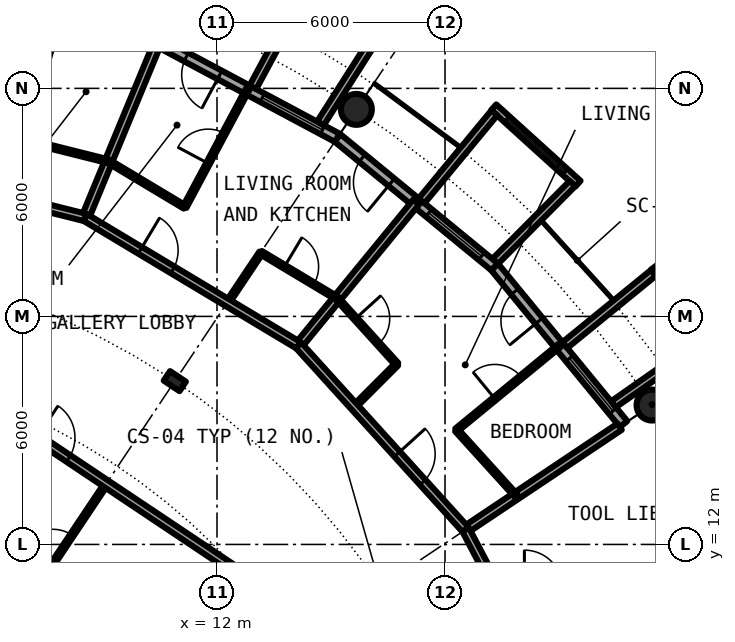
"""IFC4 building model, lengths in metres.
Left out: names, types, materials, properties, quantities, classifications, styles, units other than length and angle.
Written with IfcOpenShell. Run it as: python <this file> out.ifc"""

import sys

from ifc_helpers import new_model, si_unit, direction, frame, frame_2d, origin, origin_2d, place, context, subcontext, project, spatial, rectangle, circle, hollow_circle, i_section, extrude, element, fill, save


model = new_model("IFC4")
c1 = context("Model", 3, precision=1e-05, world=origin(), true_north=direction((0.0, 1.0)))
c2 = subcontext(c1, "Body", "Model", "MODEL_VIEW")
j1 = project(units=[si_unit("LENGTHUNIT", "METRE"), si_unit("PLANEANGLEUNIT", "RADIAN")], contexts=[c1])
p1 = place(None, origin())
s1 = spatial("IfcSite", under=j1, at=p1, CompositionType="ELEMENT")
p2 = place(p1, origin())
s2 = spatial("IfcBuilding", under=s1, at=p2, CompositionType="ELEMENT")
p3 = place(p2, frame((0.0, 0.0, 145.2)))
s3 = spatial("IfcBuildingStorey", under=s2, at=p3, CompositionType="ELEMENT", Elevation=145.2)
for number, where, z_axis, x_axis in (
    (1, (23.448, 15.667, 0.0), (0.0, 0.0, 1.0), (1.0, 0.0, 0.0)),
    (2, (15.667, 23.448, 0.0), (0.0, 0.0, 1.0), (1.0, 0.0, 0.0)),
):
    element("IfcColumn", number, at=place(p3, frame(where, z_axis=z_axis, x_axis=x_axis)), inside=s3, PredefinedType="COLUMN", context=c2, shape_type="SweptSolid", body=[
        extrude(hollow_circle(Radius=0.406, WallThickness=0.04, at=origin_2d()), origin(), (0.0, 0.0, 1.0), 3.05),
    ])
p4 = place(p3, frame((10.889, 16.297, 0.0), z_axis=(0.0, 0.0, 1.0), x_axis=(0.55557023302, 0.831469612303, 0.0)))
e3 = element("IfcColumn", 3, at=p4, inside=s3, PredefinedType="COLUMN", context=c2, shape_type="SweptSolid", body=[
    extrude(i_section(OverallWidth=0.3, OverallDepth=0.5, WebThickness=0.014, FlangeThickness=0.028, FilletRadius=0.027, at=origin_2d()), origin(), (0.0, 0.0, 1.0), 3.05),
])
p5 = place(p3, frame((22.699, 15.167, 0.0), z_axis=(0.0, 0.0, 1.0), x_axis=(-0.634382322723, 0.773019449054, 0.0)))
e4 = element("IfcWall", 4, at=p5, inside=s3, PredefinedType="SOLIDWALL", context=c2, shape_type="SweptSolid", body=[
    extrude(rectangle(XDim=5.352, YDim=0.25, at=frame_2d((2.676, 0.0))), origin(), (0.0, 0.0, 1.0), 2.7),
])
p6 = place(p5, frame((0.441, 0.0, 0.3)))
e5 = element("IfcOpeningElement", 5, at=p6, cuts=e4, PredefinedType="OPENING", context=c2, shape_type="SweptSolid", body=[
    extrude(rectangle(XDim=1.8, YDim=2.1, at=frame_2d((0.9, 1.05))), frame((0.0, 0.135, 0.0), z_axis=(0.0, -1.0, 0.0), x_axis=(1.0, 0.0, 0.0)), (0.0, 0.0, 1.0), 0.27),
])
p7 = place(p5, frame((3.51, 0.0, 0.0)))
e6 = element("IfcOpeningElement", 6, at=p7, cuts=e4, PredefinedType="OPENING", context=c2, shape_type="SweptSolid", body=[
    extrude(rectangle(XDim=1.0, YDim=2.2, at=frame_2d((0.5, 1.1))), frame((0.0, 0.135, 0.0), z_axis=(0.0, -1.0, 0.0), x_axis=(1.0, 0.0, 0.0)), (0.0, 0.0, 1.0), 0.27),
])
p8 = place(p3, frame((24.972, 17.337, -0.03), z_axis=(0.0, 0.0, 1.0), x_axis=(-0.602806268067, 0.797887588059, 0.0)))
e7 = element("IfcWall", 7, at=p8, inside=s3, PredefinedType="SOLIDWALL", context=c2, shape_type="SweptSolid", body=[
    extrude(rectangle(XDim=2.447, YDim=0.2, at=frame_2d((1.223, 0.0))), origin(), (0.0, 0.0, 1.0), 2.73),
])
p9 = place(p8, frame((0.183, 0.0, 0.33)))
e8 = element("IfcOpeningElement", 8, at=p9, cuts=e7, PredefinedType="OPENING", context=c2, shape_type="SweptSolid", body=[
    extrude(circle(Radius=1.04, at=frame_2d((1.04, 1.04))), frame((0.0, 0.11, 0.0), z_axis=(0.0, -1.0, 0.0), x_axis=(1.0, 0.0, 0.0)), (0.0, 0.0, 1.0), 0.22),
])
p10 = place(p3, frame((22.433, 15.688, -0.03), z_axis=(0.0, 0.0, 1.0), x_axis=(0.819373043115, 0.573260687834, 0.0)))
e9 = element("IfcWall", 9, at=p10, inside=s3, PredefinedType="SOLIDWALL", context=c2, shape_type="SweptSolid", body=[
    extrude(rectangle(XDim=2.925, YDim=0.2, at=frame_2d((1.463, 0.0))), origin(), (0.0, 0.0, 1.0), 2.73),
])
p11 = place(p3, frame((21.155, 17.246, -0.03), z_axis=(0.0, 0.0, 1.0), x_axis=(0.775179004516, 0.631741648902, 0.0)))
e10 = element("IfcWall", 10, at=p11, inside=s3, PredefinedType="SOLIDWALL", context=c2, shape_type="SweptSolid", body=[
    extrude(rectangle(XDim=3.006, YDim=0.2, at=frame_2d((1.503, 0.0))), origin(), (0.0, 0.0, 1.0), 2.73),
])
p12 = place(p3, frame((19.304, 19.304, 0.0), z_axis=(0.0, 0.0, 1.0), x_axis=(-0.773019449054, 0.634382322723, 0.0)))
e11 = element("IfcWall", 11, at=p12, inside=s3, PredefinedType="SOLIDWALL", context=c2, shape_type="SweptSolid", body=[
    extrude(rectangle(XDim=5.352, YDim=0.25, at=frame_2d((2.676, 0.0))), origin(), (0.0, 0.0, 1.0), 2.7),
])
p13 = place(p12, frame((0.441, 0.0, 0.3)))
e12 = element("IfcOpeningElement", 12, at=p13, cuts=e11, PredefinedType="OPENING", context=c2, shape_type="SweptSolid", body=[
    extrude(rectangle(XDim=1.8, YDim=2.1, at=frame_2d((0.9, 1.05))), frame((0.0, 0.135, 0.0), z_axis=(0.0, -1.0, 0.0), x_axis=(1.0, 0.0, 0.0)), (0.0, 0.0, 1.0), 0.27),
])
p14 = place(p12, frame((3.51, 0.0, 0.0)))
e13 = element("IfcOpeningElement", 13, at=p14, cuts=e11, PredefinedType="OPENING", context=c2, shape_type="SweptSolid", body=[
    extrude(rectangle(XDim=1.0, YDim=2.2, at=frame_2d((0.5, 1.1))), frame((0.0, 0.135, 0.0), z_axis=(0.0, -1.0, 0.0), x_axis=(1.0, 0.0, 0.0)), (0.0, 0.0, 1.0), 0.27),
])
p15 = place(p3, frame((21.5, 21.493, -0.03), z_axis=(0.0, 0.0, 1.0), x_axis=(-0.740998365753, 0.671506829416, 0.0)))
e14 = element("IfcWall", 14, at=p15, inside=s3, PredefinedType="SOLIDWALL", context=c2, shape_type="SweptSolid", body=[
    extrude(rectangle(XDim=2.993, YDim=0.2, at=frame_2d((1.497, 0.0))), origin(), (0.0, 0.0, 1.0), 2.73),
])
p16 = place(p15, frame((0.457, 0.0, 0.33)))
e15 = element("IfcOpeningElement", 15, at=p16, cuts=e14, PredefinedType="OPENING", context=c2, shape_type="SweptSolid", body=[
    extrude(circle(Radius=1.04, at=frame_2d((1.04, 1.04))), frame((0.0, 0.11, 0.0), z_axis=(0.0, -1.0, 0.0), x_axis=(1.0, 0.0, 0.0)), (0.0, 0.0, 1.0), 0.22),
])
p17 = place(p3, frame((19.323, 19.45, -0.03), z_axis=(0.0, 0.0, 1.0), x_axis=(0.704476739375, 0.709727076896, 0.0)))
e16 = element("IfcWall", 16, at=p17, inside=s3, PredefinedType="SOLIDWALL", context=c2, shape_type="SweptSolid", body=[
    extrude(rectangle(XDim=2.883, YDim=0.2, at=frame_2d((1.441, 0.0))), origin(), (0.0, 0.0, 1.0), 2.73),
])
p18 = place(p3, frame((17.384, 21.041, -0.03), z_axis=(0.0, 0.0, 1.0), x_axis=(0.63709551667, 0.770784861449, 0.0)))
e17 = element("IfcWall", 17, at=p18, inside=s3, PredefinedType="SOLIDWALL", context=c2, shape_type="SweptSolid", body=[
    extrude(rectangle(XDim=3.006, YDim=0.2, at=frame_2d((1.503, 0.0))), origin(), (0.0, 0.0, 1.0), 2.73),
])
p19 = place(p3, frame((15.167, 22.699, 0.0), z_axis=(0.0, 0.0, 1.0), x_axis=(-0.881915646801, 0.471407246368, 0.0)))
e18 = element("IfcWall", 18, at=p19, inside=s3, PredefinedType="SOLIDWALL", context=c2, shape_type="SweptSolid", body=[
    extrude(rectangle(XDim=5.352, YDim=0.25, at=frame_2d((2.676, 0.0))), origin(), (0.0, 0.0, 1.0), 2.7),
])
p20 = place(p19, frame((0.441, 0.0, 0.3)))
e19 = element("IfcOpeningElement", 19, at=p20, cuts=e18, PredefinedType="OPENING", context=c2, shape_type="SweptSolid", body=[
    extrude(rectangle(XDim=1.8, YDim=2.1, at=frame_2d((0.9, 1.05))), frame((0.0, 0.135, 0.0), z_axis=(0.0, -1.0, 0.0), x_axis=(1.0, 0.0, 0.0)), (0.0, 0.0, 1.0), 0.27),
])
p21 = place(p19, frame((3.51, 0.0, 0.0)))
e20 = element("IfcOpeningElement", 20, at=p21, cuts=e18, PredefinedType="OPENING", context=c2, shape_type="SweptSolid", body=[
    extrude(rectangle(XDim=1.0, YDim=2.2, at=frame_2d((0.5, 1.1))), frame((0.0, 0.135, 0.0), z_axis=(0.0, -1.0, 0.0), x_axis=(1.0, 0.0, 0.0)), (0.0, 0.0, 1.0), 0.27),
])
p22 = place(p3, frame((14.722, 23.079, -0.03), z_axis=(0.0, 0.0, 1.0), x_axis=(0.537572179146, 0.843217737129, 0.0)))
e21 = element("IfcWall", 21, at=p22, inside=s3, PredefinedType="SOLIDWALL", context=c2, shape_type="SweptSolid", body=[
    extrude(rectangle(XDim=2.924, YDim=0.2, at=frame_2d((1.462, 0.0))), origin(), (0.0, 0.0, 1.0), 2.73),
])
p23 = place(p3, frame((12.945, 24.029, -0.03), z_axis=(0.0, 0.0, 1.0), x_axis=(0.474424310775, 0.88029629861, 0.0)))
e22 = element("IfcWall", 22, at=p23, inside=s3, PredefinedType="SOLIDWALL", context=c2, shape_type="SweptSolid", body=[
    extrude(rectangle(XDim=3.006, YDim=0.2, at=frame_2d((1.503, 0.0))), origin(), (0.0, 0.0, 1.0), 2.73),
])
p24 = place(p3, frame((6.78, 10.147, 0.0), z_axis=(0.0, 0.0, 1.0), x_axis=(0.555528237031, 0.831497671591, 0.0)))
e23 = element("IfcWall", 23, at=p24, inside=s3, PredefinedType="PARTITIONING", context=c2, shape_type="SweptSolid", body=[
    extrude(rectangle(XDim=4.149, YDim=0.1, at=frame_2d((2.075, 0.0))), origin(), (0.0, 0.0, 1.0), 2.7),
])
p25 = place(p24, frame((1.625, 0.0, 0.0)))
e24 = element("IfcOpeningElement", 24, at=p25, cuts=e23, PredefinedType="OPENING", context=c2, shape_type="SweptSolid", body=[
    extrude(rectangle(XDim=0.9, YDim=2.3, at=frame_2d((0.45, 1.15))), frame((0.0, 0.06, 0.0), z_axis=(0.0, -1.0, 0.0), x_axis=(1.0, 0.0, 0.0)), (0.0, 0.0, 1.0), 0.12),
])
p26 = place(p3, frame((6.878, 22.649, 0.0), z_axis=(0.0, 0.0, 1.0), x_axis=(0.290784578865, 0.956788549625, 0.0)))
e25 = element("IfcWall", 25, at=p26, inside=s3, PredefinedType="PARTITIONING", context=c2, shape_type="SweptSolid", body=[
    extrude(rectangle(XDim=3.504, YDim=0.1, at=frame_2d((1.752, 0.0))), origin(), (0.0, 0.0, 1.0), 2.7),
])
p27 = place(p26, frame((1.302, 0.0, 0.0)))
e26 = element("IfcOpeningElement", 26, at=p27, cuts=e25, PredefinedType="OPENING", context=c2, shape_type="SweptSolid", body=[
    extrude(rectangle(XDim=0.9, YDim=2.3, at=frame_2d((0.45, 1.15))), frame((0.0, 0.06, 0.0), z_axis=(0.0, -1.0, 0.0), x_axis=(1.0, 0.0, 0.0)), (0.0, 0.0, 1.0), 0.12),
])
p28 = place(p3, frame((8.534, 20.603, 0.0), z_axis=(0.0, 0.0, 1.0), x_axis=(0.382651153718, 0.923892902104, 0.0)))
e27 = element("IfcWall", 27, at=p28, inside=s3, PredefinedType="PARTITIONING", context=c2, shape_type="SweptSolid", body=[
    extrude(rectangle(XDim=4.874, YDim=0.2, at=frame_2d((2.437, 0.0))), origin(), (0.0, 0.0, 1.0), 2.7),
])
p29 = place(p3, frame((12.276, 18.36, 0.0), z_axis=(0.0, 0.0, 1.0), x_axis=(0.556086174374, 0.831124639672, 0.0)))
e28 = element("IfcWall", 28, at=p29, inside=s3, PredefinedType="PARTITIONING", context=c2, shape_type="SweptSolid", body=[
    extrude(rectangle(XDim=1.584, YDim=0.1, at=frame_2d((0.792, 0.0))), origin(), (0.0, 0.0, 1.0), 2.7),
])
p30 = place(p3, frame((14.147, 17.238, 0.0), z_axis=(0.0, 0.0, 1.0), x_axis=(0.634374159378, 0.773026148273, 0.0)))
e29 = element("IfcWall", 29, at=p30, inside=s3, PredefinedType="PARTITIONING", context=c2, shape_type="SweptSolid", body=[
    extrude(rectangle(XDim=4.876, YDim=0.2, at=frame_2d((2.438, 0.0))), origin(), (0.0, 0.0, 1.0), 2.7),
])
p31 = place(p3, frame((15.612, 15.622, 0.0), z_axis=(0.0, 0.0, 1.0), x_axis=(0.70679853939, 0.707414888673, 0.0)))
e30 = element("IfcWall", 30, at=p31, inside=s3, PredefinedType="PARTITIONING", context=c2, shape_type="SweptSolid", body=[
    extrude(rectangle(XDim=1.584, YDim=0.1, at=frame_2d((0.792, 0.0))), origin(), (0.0, 0.0, 1.0), 2.7),
])
p32 = place(p3, frame((18.302, 15.01, 0.0), z_axis=(0.0, 0.0, 1.0), x_axis=(0.773165322764, 0.634204528267, 0.0)))
e31 = element("IfcWall", 31, at=p32, inside=s3, PredefinedType="PARTITIONING", context=c2, shape_type="SweptSolid", body=[
    extrude(rectangle(XDim=3.505, YDim=0.1, at=frame_2d((1.752, 0.0))), origin(), (0.0, 0.0, 1.0), 2.7),
])
p33 = place(p32, frame((1.303, 0.0, 0.0)))
e32 = element("IfcOpeningElement", 32, at=p33, cuts=e31, PredefinedType="OPENING", context=c2, shape_type="SweptSolid", body=[
    extrude(rectangle(XDim=0.9, YDim=2.3, at=frame_2d((0.45, 1.15))), frame((0.0, 0.06, 0.0), z_axis=(0.0, -1.0, 0.0), x_axis=(1.0, 0.0, 0.0)), (0.0, 0.0, 1.0), 0.12),
])
p34 = place(p3, frame((18.542, 12.389, 0.0), z_axis=(0.0, 0.0, 1.0), x_axis=(0.831387096605, 0.55569370664, 0.0)))
e33 = element("IfcWall", 33, at=p34, inside=s3, PredefinedType="PARTITIONING", context=c2, shape_type="SweptSolid", body=[
    extrude(rectangle(XDim=4.875, YDim=0.2, at=frame_2d((2.438, 0.0))), origin(), (0.0, 0.0, 1.0), 2.7),
])
p35 = place(p3, frame((11.151, 20.879, 0.0), z_axis=(0.0, 0.0, 1.0), x_axis=(0.471372600501, 0.881934165058, 0.0)))
e34 = element("IfcWall", 34, at=p35, inside=s3, PredefinedType="PARTITIONING", context=c2, shape_type="SweptSolid", body=[
    extrude(rectangle(XDim=3.505, YDim=0.1, at=frame_2d((1.752, 0.0))), origin(), (0.0, 0.0, 1.0), 2.7),
])
p36 = place(p35, frame((1.302, 0.0, 0.0)))
e35 = element("IfcOpeningElement", 35, at=p36, cuts=e34, PredefinedType="OPENING", context=c2, shape_type="SweptSolid", body=[
    extrude(rectangle(XDim=0.9, YDim=2.3, at=frame_2d((0.45, 1.15))), frame((0.0, 0.06, 0.0), z_axis=(0.0, -1.0, 0.0), x_axis=(1.0, 0.0, 0.0)), (0.0, 0.0, 1.0), 0.12),
])
p37 = place(p3, frame((3.453, 17.36, 0.0), z_axis=(0.0, 0.0, 1.0), x_axis=(0.831437137577, -0.555618831806, 0.0)))
e36 = element("IfcWall", 36, at=p37, inside=s3, PredefinedType="PARTITIONING", context=c2, shape_type="SweptSolid", body=[
    extrude(rectangle(XDim=13.549, YDim=0.2, at=frame_2d((6.774, 0.0))), origin(), (0.0, 0.0, 1.0), 2.7),
])
p38 = place(p37, frame((4.581, 0.0, 0.0)))
e37 = element("IfcOpeningElement", 37, at=p38, cuts=e36, PredefinedType="OPENING", context=c2, shape_type="SweptSolid", body=[
    extrude(rectangle(XDim=1.0, YDim=2.3, at=frame_2d((0.5, 1.15))), frame((0.0, 0.11, 0.0), z_axis=(0.0, -1.0, 0.0), x_axis=(1.0, 0.0, 0.0)), (0.0, 0.0, 1.0), 0.22),
])
p39 = place(p3, frame((2.186, 22.193, 0.0), z_axis=(0.0, 0.0, 1.0), x_axis=(0.97003047456, -0.242983288366, 0.0)))
e38 = element("IfcWall", 38, at=p39, inside=s3, PredefinedType="PARTITIONING", context=c2, shape_type="SweptSolid", body=[
    extrude(rectangle(XDim=6.544, YDim=0.2, at=frame_2d((3.272, 0.0))), origin(), (0.0, 0.0, 1.0), 2.7),
])
p40 = place(p39, frame((3.863, 0.0, 0.0)))
e39 = element("IfcOpeningElement", 39, at=p40, cuts=e38, PredefinedType="OPENING", context=c2, shape_type="SweptSolid", body=[
    extrude(rectangle(XDim=1.0, YDim=2.3, at=frame_2d((0.5, 1.15))), frame((0.0, 0.11, 0.0), z_axis=(0.0, -1.0, 0.0), x_axis=(1.0, 0.0, 0.0)), (0.0, 0.0, 1.0), 0.22),
])
p41 = place(p3, frame((8.534, 20.603, 0.0), z_axis=(0.0, 0.0, 1.0), x_axis=(0.857683781508, -0.514177528621, 0.0)))
e40 = element("IfcWall", 40, at=p41, inside=s3, PredefinedType="PARTITIONING", context=c2, shape_type="SweptSolid", body=[
    extrude(rectangle(XDim=6.544, YDim=0.2, at=frame_2d((3.272, 0.0))), origin(), (0.0, 0.0, 1.0), 2.7),
])
p42 = place(p41, frame((1.682, 0.0, 0.0)))
e41 = element("IfcOpeningElement", 41, at=p42, cuts=e40, PredefinedType="OPENING", context=c2, shape_type="SweptSolid", body=[
    extrude(rectangle(XDim=1.0, YDim=2.3, at=frame_2d((0.5, 1.15))), frame((0.0, 0.11, 0.0), z_axis=(0.0, -1.0, 0.0), x_axis=(1.0, 0.0, 0.0)), (0.0, 0.0, 1.0), 0.22),
])
p43 = place(p3, frame((14.147, 17.238, 0.0), z_axis=(0.0, 0.0, 1.0), x_axis=(0.671561669125, -0.740948665268, 0.0)))
e42 = element("IfcWall", 42, at=p43, inside=s3, PredefinedType="PARTITIONING", context=c2, shape_type="SweptSolid", body=[
    extrude(rectangle(XDim=6.544, YDim=0.2, at=frame_2d((3.272, 0.0))), origin(), (0.0, 0.0, 1.0), 2.7),
])
p44 = place(p43, frame((3.862, 0.0, 0.0)))
e43 = element("IfcOpeningElement", 43, at=p44, cuts=e42, PredefinedType="OPENING", context=c2, shape_type="SweptSolid", body=[
    extrude(rectangle(XDim=1.0, YDim=2.3, at=frame_2d((0.5, 1.15))), frame((0.0, 0.11, 0.0), z_axis=(0.0, -1.0, 0.0), x_axis=(1.0, 0.0, 0.0)), (0.0, 0.0, 1.0), 0.22),
])
p45 = place(p3, frame((18.542, 12.389, 0.0), z_axis=(0.0, 0.0, 1.0), x_axis=(0.465605550524, -0.884992356646, 0.0)))
e44 = element("IfcWall", 44, at=p45, inside=s3, PredefinedType="PARTITIONING", context=c2, shape_type="SweptSolid", body=[
    extrude(rectangle(XDim=1.643, YDim=0.2, at=frame_2d((0.821, 0.0))), origin(), (0.0, 0.0, 1.0), 2.7),
])
p46 = place(p3, frame((6.88, 22.648, 0.0), z_axis=(0.0, 0.0, 1.0), x_axis=(0.9700564467, -0.242879579658, 0.0)))
e45 = element("IfcWall", 45, at=p46, inside=s3, PredefinedType="PARTITIONING", context=c2, shape_type="SweptSolid", body=[
    extrude(rectangle(XDim=2.338, YDim=0.1, at=frame_2d((1.169, 0.0))), origin(), (0.0, 0.0, 1.0), 2.7),
])
p47 = place(p3, frame((9.146, 22.081, 0.0), z_axis=(0.0, 0.0, 1.0), x_axis=(0.857640331606, -0.514249999127, 0.0)))
e46 = element("IfcWall", 46, at=p47, inside=s3, PredefinedType="PARTITIONING", context=c2, shape_type="SweptSolid", body=[
    extrude(rectangle(XDim=2.338, YDim=0.1, at=frame_2d((1.169, 0.0))), origin(), (0.0, 0.0, 1.0), 2.7),
])
p48 = place(p3, frame((13.157, 19.677, 0.0), z_axis=(0.0, 0.0, 1.0), x_axis=(0.857714000218, -0.514127118358, 0.0)))
e47 = element("IfcWall", 47, at=p48, inside=s3, PredefinedType="PARTITIONING", context=c2, shape_type="SweptSolid", body=[
    extrude(rectangle(XDim=2.338, YDim=0.1, at=frame_2d((1.169, 0.0))), origin(), (0.0, 0.0, 1.0), 2.7),
])
p49 = place(p48, frame((0.719, 0.0, 0.0)))
e48 = element("IfcOpeningElement", 48, at=p49, cuts=e47, PredefinedType="OPENING", context=c2, shape_type="SweptSolid", body=[
    extrude(rectangle(XDim=0.9, YDim=2.3, at=frame_2d((0.45, 1.15))), frame((0.0, 0.06, 0.0), z_axis=(0.0, -1.0, 0.0), x_axis=(1.0, 0.0, 0.0)), (0.0, 0.0, 1.0), 0.12),
])
p50 = place(p3, frame((15.162, 18.475, 0.0), z_axis=(0.0, 0.0, 1.0), x_axis=(0.671528384412, -0.740978831634, 0.0)))
e49 = element("IfcWall", 49, at=p50, inside=s3, PredefinedType="PARTITIONING", context=c2, shape_type="SweptSolid", body=[
    extrude(rectangle(XDim=2.338, YDim=0.1, at=frame_2d((1.169, 0.0))), origin(), (0.0, 0.0, 1.0), 2.7),
])
p51 = place(p50, frame((0.719, 0.0, 0.0)))
e50 = element("IfcOpeningElement", 50, at=p51, cuts=e49, PredefinedType="OPENING", context=c2, shape_type="SweptSolid", body=[
    extrude(rectangle(XDim=0.9, YDim=2.3, at=frame_2d((0.45, 1.15))), frame((0.0, 0.06, 0.0), z_axis=(0.0, -1.0, 0.0), x_axis=(1.0, 0.0, 0.0)), (0.0, 0.0, 1.0), 0.12),
])
p52 = place(p3, frame((18.302, 15.01, 0.0), z_axis=(0.0, 0.0, 1.0), x_axis=(0.671637685376, -0.740879760544, 0.0)))
e51 = element("IfcWall", 51, at=p52, inside=s3, PredefinedType="PARTITIONING", context=c2, shape_type="SweptSolid", body=[
    extrude(rectangle(XDim=2.338, YDim=0.1, at=frame_2d((1.169, 0.0))), origin(), (0.0, 0.0, 1.0), 2.7),
])
p53 = place(p6, origin())
e52 = element("IfcWindow", 52, at=p53, inside=s3, PartitioningType="SINGLE_PANEL", PredefinedType="WINDOW", context=c2, shape_type="SweptSolid", body=[
    extrude(rectangle(XDim=1.8, YDim=2.1, at=frame_2d((0.9, 1.05))), frame((0.0, 0.03, 0.0), z_axis=(0.0, -1.0, 0.0), x_axis=(1.0, 0.0, 0.0)), (0.0, 0.0, 1.0), 0.06),
])
fill(e5, e52)
p54 = place(p7, origin())
e53 = element("IfcDoor", 53, at=p54, inside=s3, OperationType="SINGLE_SWING_LEFT", PredefinedType="DOOR", context=c2, shape_type="SweptSolid", body=[
    extrude(rectangle(XDim=1.0, YDim=2.2, at=frame_2d((0.5, 1.1))), frame((0.0, 0.025, 0.0), z_axis=(0.0, -1.0, 0.0), x_axis=(1.0, 0.0, 0.0)), (0.0, 0.0, 1.0), 0.05),
])
fill(e6, e53)
p55 = place(p13, origin())
e54 = element("IfcWindow", 54, at=p55, inside=s3, PartitioningType="SINGLE_PANEL", PredefinedType="WINDOW", context=c2, shape_type="SweptSolid", body=[
    extrude(rectangle(XDim=1.8, YDim=2.1, at=frame_2d((0.9, 1.05))), frame((0.0, 0.03, 0.0), z_axis=(0.0, -1.0, 0.0), x_axis=(1.0, 0.0, 0.0)), (0.0, 0.0, 1.0), 0.06),
])
fill(e12, e54)
p56 = place(p16, origin())
e55 = element("IfcWindow", 55, at=p56, inside=s3, PartitioningType="SINGLE_PANEL", PredefinedType="WINDOW", context=c2, shape_type="SweptSolid", body=[
    extrude(circle(Radius=1.04, at=frame_2d((1.04, 1.04))), frame((0.0, 0.03, 0.0), z_axis=(0.0, -1.0, 0.0), x_axis=(1.0, 0.0, 0.0)), (0.0, 0.0, 1.0), 0.06),
])
fill(e15, e55)
p57 = place(p14, origin())
e56 = element("IfcDoor", 56, at=p57, inside=s3, OperationType="SINGLE_SWING_LEFT", PredefinedType="DOOR", context=c2, shape_type="SweptSolid", body=[
    extrude(rectangle(XDim=1.0, YDim=2.2, at=frame_2d((0.5, 1.1))), frame((0.0, 0.025, 0.0), z_axis=(0.0, -1.0, 0.0), x_axis=(1.0, 0.0, 0.0)), (0.0, 0.0, 1.0), 0.05),
])
fill(e13, e56)
p58 = place(p20, origin())
e57 = element("IfcWindow", 57, at=p58, inside=s3, PartitioningType="SINGLE_PANEL", PredefinedType="WINDOW", context=c2, shape_type="SweptSolid", body=[
    extrude(rectangle(XDim=1.8, YDim=2.1, at=frame_2d((0.9, 1.05))), frame((0.0, 0.03, 0.0), z_axis=(0.0, -1.0, 0.0), x_axis=(1.0, 0.0, 0.0)), (0.0, 0.0, 1.0), 0.06),
])
fill(e19, e57)
p59 = place(p21, origin())
e58 = element("IfcDoor", 58, at=p59, inside=s3, OperationType="SINGLE_SWING_LEFT", PredefinedType="DOOR", context=c2, shape_type="SweptSolid", body=[
    extrude(rectangle(XDim=1.0, YDim=2.2, at=frame_2d((0.5, 1.1))), frame((0.0, 0.025, 0.0), z_axis=(0.0, -1.0, 0.0), x_axis=(1.0, 0.0, 0.0)), (0.0, 0.0, 1.0), 0.05),
])
fill(e20, e58)
p60 = place(p44, origin())
e59 = element("IfcDoor", 59, at=p60, inside=s3, OperationType="SINGLE_SWING_RIGHT", PredefinedType="DOOR", context=c2, shape_type="SweptSolid", body=[
    extrude(rectangle(XDim=1.0, YDim=2.3, at=frame_2d((0.5, 1.15))), frame((0.0, 0.025, 0.0), z_axis=(0.0, -1.0, 0.0), x_axis=(1.0, 0.0, 0.0)), (0.0, 0.0, 1.0), 0.05),
])
fill(e43, e59)
p61 = place(p51, origin())
e60 = element("IfcDoor", 60, at=p61, inside=s3, OperationType="SINGLE_SWING_LEFT", PredefinedType="DOOR", context=c2, shape_type="SweptSolid", body=[
    extrude(rectangle(XDim=0.9, YDim=2.3, at=frame_2d((0.45, 1.15))), frame((0.0, 0.025, 0.0), z_axis=(0.0, -1.0, 0.0), x_axis=(1.0, 0.0, 0.0)), (0.0, 0.0, 1.0), 0.05),
])
fill(e50, e60)
p62 = place(p33, origin())
e61 = element("IfcDoor", 61, at=p62, inside=s3, OperationType="SINGLE_SWING_RIGHT", PredefinedType="DOOR", context=c2, shape_type="SweptSolid", body=[
    extrude(rectangle(XDim=0.9, YDim=2.3, at=frame_2d((0.45, 1.15))), frame((0.0, 0.025, 0.0), z_axis=(0.0, -1.0, 0.0), x_axis=(1.0, 0.0, 0.0)), (0.0, 0.0, 1.0), 0.05),
])
fill(e32, e61)
p63 = place(p42, origin())
e62 = element("IfcDoor", 62, at=p63, inside=s3, OperationType="SINGLE_SWING_LEFT", PredefinedType="DOOR", context=c2, shape_type="SweptSolid", body=[
    extrude(rectangle(XDim=1.0, YDim=2.3, at=frame_2d((0.5, 1.15))), frame((0.0, 0.025, 0.0), z_axis=(0.0, -1.0, 0.0), x_axis=(1.0, 0.0, 0.0)), (0.0, 0.0, 1.0), 0.05),
])
fill(e41, e62)
p64 = place(p49, origin())
e63 = element("IfcDoor", 63, at=p64, inside=s3, OperationType="SINGLE_SWING_RIGHT", PredefinedType="DOOR", context=c2, shape_type="SweptSolid", body=[
    extrude(rectangle(XDim=0.9, YDim=2.3, at=frame_2d((0.45, 1.15))), frame((0.0, 0.025, 0.0), z_axis=(0.0, -1.0, 0.0), x_axis=(1.0, 0.0, 0.0)), (0.0, 0.0, 1.0), 0.05),
])
fill(e48, e63)
p65 = place(p36, origin())
e64 = element("IfcDoor", 64, at=p65, inside=s3, OperationType="SINGLE_SWING_LEFT", PredefinedType="DOOR", context=c2, shape_type="SweptSolid", body=[
    extrude(rectangle(XDim=0.9, YDim=2.3, at=frame_2d((0.45, 1.15))), frame((0.0, 0.025, 0.0), z_axis=(0.0, -1.0, 0.0), x_axis=(1.0, 0.0, 0.0)), (0.0, 0.0, 1.0), 0.05),
])
fill(e35, e64)
p66 = place(p38, origin())
e65 = element("IfcDoor", 65, at=p66, inside=s3, OperationType="SINGLE_SWING_LEFT", PredefinedType="DOOR", context=c2, shape_type="SweptSolid", body=[
    extrude(rectangle(XDim=1.0, YDim=2.3, at=frame_2d((0.5, 1.15))), frame((0.0, 0.025, 0.0), z_axis=(0.0, -1.0, 0.0), x_axis=(1.0, 0.0, 0.0)), (0.0, 0.0, 1.0), 0.05),
])
fill(e37, e65)
p67 = place(p25, origin())
e66 = element("IfcDoor", 66, at=p67, inside=s3, OperationType="SINGLE_SWING_RIGHT", PredefinedType="DOOR", context=c2, shape_type="SweptSolid", body=[
    extrude(rectangle(XDim=0.9, YDim=2.3, at=frame_2d((0.45, 1.15))), frame((0.0, 0.025, 0.0), z_axis=(0.0, -1.0, 0.0), x_axis=(1.0, 0.0, 0.0)), (0.0, 0.0, 1.0), 0.05),
])
fill(e24, e66)
save(model, sys.argv[1])
